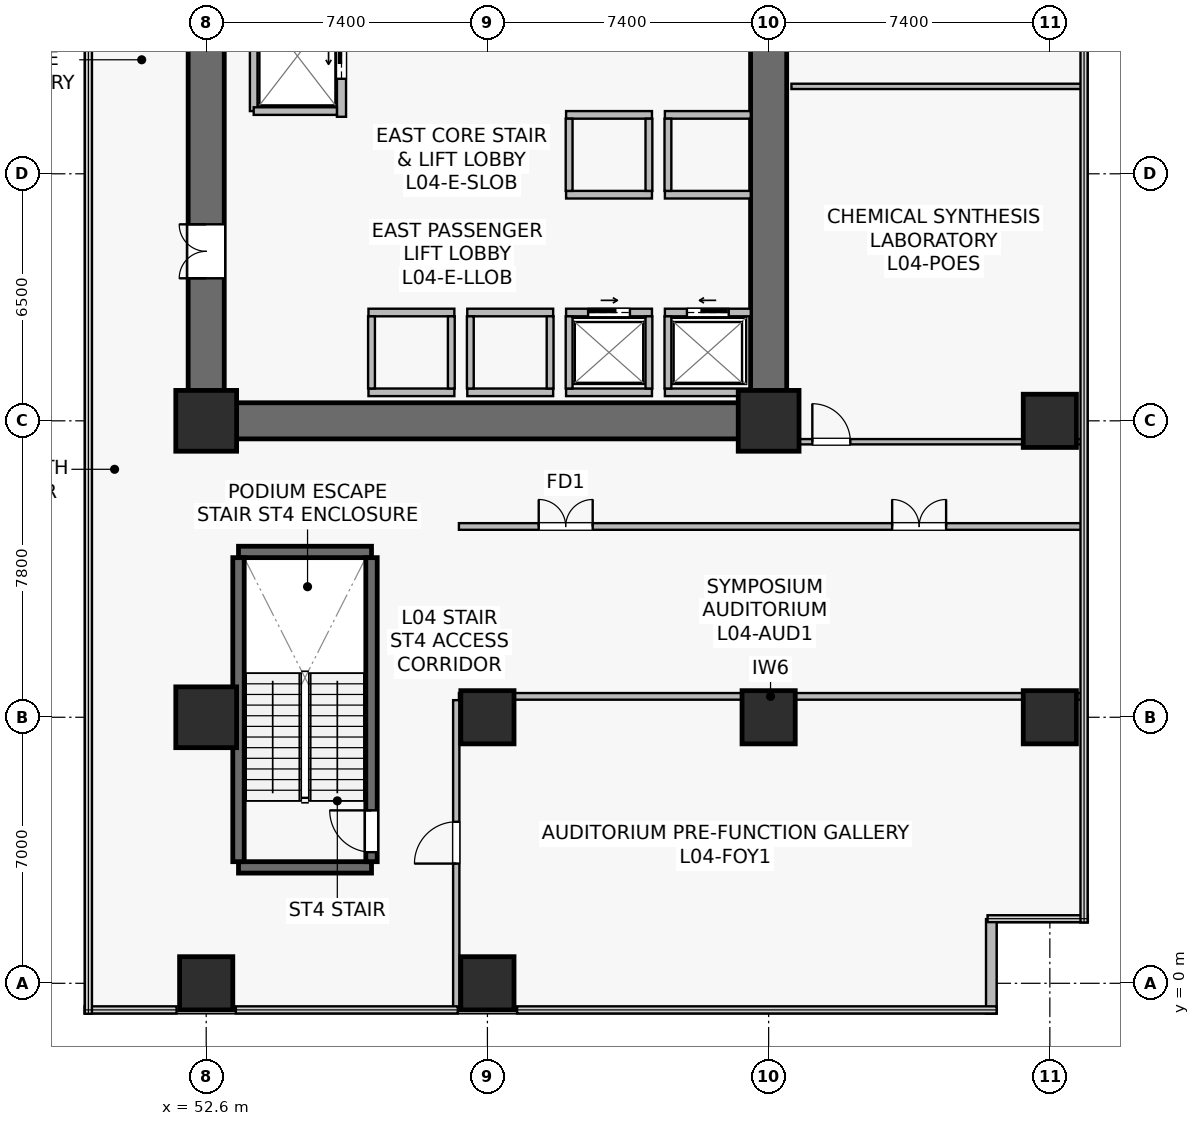
"""IFC4 building model, lengths in metres.
Left out: names, types, materials, properties, quantities, classifications, styles, units other than length and angle.
Written with IfcOpenShell. Run it as: python <this file> out.ifc"""

import sys

from ifc_helpers import new_model, si_unit, direction, frame, frame_2d, origin, origin_2d, place, context, subcontext, project, spatial, rectangle, extrude, source, transform, mapped, element, fill, save


model = new_model("IFC4")
c1 = context("Model", 3, precision=1e-05, world=origin(), true_north=direction((0.0, 1.0)))
c2 = subcontext(c1, "Body", "Model", "MODEL_VIEW")
j1 = project(units=[si_unit("LENGTHUNIT", "METRE"), si_unit("PLANEANGLEUNIT", "RADIAN")], contexts=[c1])
p1 = place(None, origin())
s1 = spatial("IfcSite", under=j1, at=p1, CompositionType="ELEMENT")
p2 = place(p1, origin())
s2 = spatial("IfcBuilding", under=s1, at=p2, CompositionType="ELEMENT")
p3 = place(p2, frame((0.0, 0.0, 15.0)))
s3 = spatial("IfcBuildingStorey", under=s2, at=p3, CompositionType="ELEMENT", Elevation=15.0)
p4 = place(p3, frame((52.125, 14.8, 0.0), z_axis=(0.0, 0.0, 1.0), x_axis=(1.0, 0.0, 0.0)))
e1 = element("IfcWall", 1, at=p4, inside=s3, PredefinedType="SHEAR", context=c2, shape_type="SweptSolid", body=[
    extrude(rectangle(XDim=15.75, YDim=0.95, at=frame_2d((7.875, 0.0))), origin(), (0.0, 0.0, 1.0), 4.45),
])
p5 = place(p3, frame((52.6, 15.275, 0.0), z_axis=(0.0, 0.0, 1.0), x_axis=(0.0, 1.0, 0.0)))
e2 = element("IfcWall", 2, at=p5, inside=s3, PredefinedType="SHEAR", context=c2, shape_type="SweptSolid", body=[
    extrude(rectangle(XDim=18.05, YDim=0.95, at=frame_2d((9.025, 0.0))), origin(), (0.0, 0.0, 1.0), 4.45),
])
p6 = place(p5, frame((3.275, 0.0, 0.0)))
e3 = element("IfcOpeningElement", 3, at=p6, cuts=e2, PredefinedType="OPENING", context=c2, shape_type="SweptSolid", body=[
    extrude(rectangle(XDim=1.42, YDim=2.2, at=frame_2d((0.71, 1.1))), frame((0.0, 0.485, 0.0), z_axis=(0.0, -1.0, 0.0), x_axis=(1.0, 0.0, 0.0)), (0.0, 0.0, 1.0), 0.97),
])
p7 = place(p3, frame((67.4, 15.275, 0.0), z_axis=(0.0, 0.0, 1.0), x_axis=(0.0, 1.0, 0.0)))
e4 = element("IfcWall", 4, at=p7, inside=s3, PredefinedType="SHEAR", context=c2, shape_type="SweptSolid", body=[
    extrude(rectangle(XDim=18.05, YDim=0.95, at=frame_2d((9.025, 0.0))), origin(), (0.0, 0.0, 1.0), 4.45),
])
for number, where, z_axis, x_axis in (
    (5, (53.45, 3.05, 0.0), (0.0, 0.0, 1.0), (1.0, 0.0, 0.0)),
    (6, (53.45, 11.35, 0.0), (0.0, 0.0, 1.0), (1.0, 0.0, 0.0)),
):
    element("IfcWall", number, at=place(p3, frame(where, z_axis=z_axis, x_axis=x_axis)), inside=s3, PredefinedType="SHEAR", context=c2, shape_type="SweptSolid", body=[
        extrude(rectangle(XDim=3.5, YDim=0.3, at=frame_2d((1.75, 0.0))), origin(), (0.0, 0.0, 1.0), 4.45),
    ])
p8 = place(p3, frame((53.45, 3.2, 0.0), z_axis=(0.0, 0.0, 1.0), x_axis=(0.0, 1.0, 0.0)))
e7 = element("IfcWall", 7, at=p8, inside=s3, PredefinedType="SHEAR", context=c2, shape_type="SweptSolid", body=[
    extrude(rectangle(XDim=8.0, YDim=0.3, at=frame_2d((4.0, 0.0))), origin(), (0.0, 0.0, 1.0), 4.45),
])
p9 = place(p3, frame((56.95, 3.2, 0.0), z_axis=(0.0, 0.0, 1.0), x_axis=(0.0, 1.0, 0.0)))
e8 = element("IfcWall", 8, at=p9, inside=s3, PredefinedType="SHEAR", context=c2, shape_type="SweptSolid", body=[
    extrude(rectangle(XDim=8.0, YDim=0.3, at=frame_2d((4.0, 0.0))), origin(), (0.0, 0.0, 1.0), 4.45),
])
p10 = place(p9, frame((0.25, 0.0, 0.0)))
e9 = element("IfcOpeningElement", 9, at=p10, cuts=e8, PredefinedType="OPENING", context=c2, shape_type="SweptSolid", body=[
    extrude(rectangle(XDim=1.1, YDim=2.15, at=frame_2d((0.55, 1.075))), frame((0.0, 0.16, 0.0), z_axis=(0.0, -1.0, 0.0), x_axis=(1.0, 0.0, 0.0)), (0.0, 0.0, 1.0), 0.32),
])
m1 = source(origin(), c2, "Body", "SweptSolid", [
    extrude(rectangle(XDim=1.6, YDim=1.6, at=origin_2d()), origin(), (0.0, 0.0, 1.0), 4.8),
])
p11 = place(p3, frame((52.6, 7.0, 0.0), z_axis=(0.0, 0.0, 1.0), x_axis=(1.0, 0.0, 0.0)))
e10 = element("IfcColumn", 10, at=p11, inside=s3, PredefinedType="COLUMN", context=c2, shape_type="MappedRepresentation", body=[
    mapped(m1, transform((0.0, 0.0, 0.0), scale=1.0)),
])
m2 = source(origin(), c2, "Body", "SweptSolid", [
    extrude(rectangle(XDim=1.4, YDim=1.4, at=origin_2d()), origin(), (0.0, 0.0, 1.0), 4.8),
])
p12 = place(p3, frame((60.0, 7.0, 0.0), z_axis=(0.0, 0.0, 1.0), x_axis=(1.0, 0.0, 0.0)))
e11 = element("IfcColumn", 11, at=p12, inside=s3, PredefinedType="COLUMN", context=c2, shape_type="MappedRepresentation", body=[
    mapped(m2, transform((0.0, 0.0, 0.0), scale=1.0)),
])
for number, where, z_axis, x_axis in (
    (12, (52.6, 14.8, 0.0), (0.0, 0.0, 1.0), (1.0, 0.0, 0.0)),
    (13, (67.4, 14.8, 0.0), (0.0, 0.0, 1.0), (1.0, 0.0, 0.0)),
):
    element("IfcColumn", number, at=place(p3, frame(where, z_axis=z_axis, x_axis=x_axis)), inside=s3, PredefinedType="COLUMN", context=c2, shape_type="MappedRepresentation", body=[
        mapped(m1, transform((0.0, 0.0, 0.0), scale=1.0)),
    ])
for number, where, z_axis, x_axis in (
    (14, (67.4, 7.0, 0.0), (0.0, 0.0, 1.0), (1.0, 0.0, 0.0)),
    (15, (74.8, 7.0, 0.0), (0.0, 0.0, 1.0), (1.0, 0.0, 0.0)),
    (16, (74.8, 14.8, 0.0), (0.0, 0.0, 1.0), (1.0, 0.0, 0.0)),
    (17, (52.6, 0.0, 0.0), (0.0, 0.0, 1.0), (1.0, 0.0, 0.0)),
    (18, (60.0, 0.0, 0.0), (0.0, 0.0, 1.0), (1.0, 0.0, 0.0)),
):
    element("IfcColumn", number, at=place(p3, frame(where, z_axis=z_axis, x_axis=x_axis)), inside=s3, PredefinedType="COLUMN", context=c2, shape_type="MappedRepresentation", body=[
        mapped(m2, transform((0.0, 0.0, 0.0), scale=1.0)),
    ])
p13 = place(p3, frame((73.26, -0.8, 0.0), z_axis=(0.0, 0.0, 1.0), x_axis=(0.0, 1.0, 0.0)))
e19 = element("IfcWall", 19, at=p13, inside=s3, PredefinedType="STANDARD", context=c2, shape_type="SweptSolid", body=[
    extrude(rectangle(XDim=2.488, YDim=0.28, at=frame_2d((1.244, 0.0))), origin(), (0.0, 0.0, 1.0), 4.45),
])
p14 = place(p3, frame((56.16, 22.8, 0.0), z_axis=(0.0, 0.0, 1.0), x_axis=(0.0, 1.0, 0.0)))
e20 = element("IfcWall", 20, at=p14, inside=s3, PredefinedType="SOLIDWALL", context=c2, shape_type="SweptSolid", body=[
    extrude(rectangle(XDim=6.85, YDim=0.24, at=frame_2d((3.425, 0.0))), origin(), (0.0, 0.0, 1.0), 3.535),
])
p15 = place(p14, frame((4.85, 0.0, 0.0)))
e21 = element("IfcOpeningElement", 21, at=p15, cuts=e20, PredefinedType="OPENING", context=c2, shape_type="SweptSolid", body=[
    extrude(rectangle(XDim=1.1, YDim=2.22, at=frame_2d((0.55, 1.11))), frame((0.0, 0.13, 0.0), z_axis=(0.0, -1.0, 0.0), x_axis=(1.0, 0.0, 0.0)), (0.0, 0.0, 1.0), 0.26),
])
p16 = place(p14, frame((1.0, 0.0, 0.0)))
e22 = element("IfcOpeningElement", 22, at=p16, cuts=e20, PredefinedType="OPENING", context=c2, shape_type="SweptSolid", body=[
    extrude(rectangle(XDim=1.2, YDim=2.22, at=frame_2d((0.6, 1.11))), frame((0.0, 0.13, 0.0), z_axis=(0.0, -1.0, 0.0), x_axis=(1.0, 0.0, 0.0)), (0.0, 0.0, 1.0), 0.26),
])
p17 = place(p3, frame((64.67, 17.65, 0.0), z_axis=(0.0, 0.0, 1.0), x_axis=(1.0, 0.0, 0.0)))
e23 = element("IfcWall", 23, at=p17, inside=s3, PredefinedType="SOLIDWALL", context=c2, shape_type="SweptSolid", body=[
    extrude(rectangle(XDim=2.26, YDim=0.2, at=frame_2d((1.13, 0.0))), origin(), (0.0, 0.0, 1.0), 4.45),
])
p18 = place(p17, frame((0.58, 0.0, 0.0)))
e24 = element("IfcOpeningElement", 24, at=p18, cuts=e23, PredefinedType="OPENING", context=c2, shape_type="SweptSolid", body=[
    extrude(rectangle(XDim=1.1, YDim=2.22, at=frame_2d((0.55, 1.11))), frame((0.0, 0.11, 0.0), z_axis=(0.0, -1.0, 0.0), x_axis=(1.0, 0.0, 0.0)), (0.0, 0.0, 1.0), 0.22),
])
p19 = place(p3, frame((64.67, 15.55, 0.0), z_axis=(0.0, 0.0, 1.0), x_axis=(1.0, 0.0, 0.0)))
e25 = element("IfcWall", 25, at=p19, inside=s3, PredefinedType="SOLIDWALL", context=c2, shape_type="SweptSolid", body=[
    extrude(rectangle(XDim=2.26, YDim=0.2, at=frame_2d((1.13, 0.0))), origin(), (0.0, 0.0, 1.0), 4.45),
])
p20 = place(p3, frame((64.75, 15.65, 0.0), z_axis=(0.0, 0.0, 1.0), x_axis=(0.0, 1.0, 0.0)))
e26 = element("IfcWall", 26, at=p20, inside=s3, PredefinedType="SOLIDWALL", context=c2, shape_type="SweptSolid", body=[
    extrude(rectangle(XDim=1.9, YDim=0.18, at=frame_2d((0.95, 0.0))), origin(), (0.0, 0.0, 1.0), 4.45),
])
p21 = place(p3, frame((62.07, 17.65, 0.0), z_axis=(0.0, 0.0, 1.0), x_axis=(1.0, 0.0, 0.0)))
e27 = element("IfcWall", 27, at=p21, inside=s3, PredefinedType="SOLIDWALL", context=c2, shape_type="SweptSolid", body=[
    extrude(rectangle(XDim=2.26, YDim=0.2, at=frame_2d((1.13, 0.0))), origin(), (0.0, 0.0, 1.0), 4.45),
])
p22 = place(p21, frame((0.58, 0.0, 0.0)))
e28 = element("IfcOpeningElement", 28, at=p22, cuts=e27, PredefinedType="OPENING", context=c2, shape_type="SweptSolid", body=[
    extrude(rectangle(XDim=1.1, YDim=2.22, at=frame_2d((0.55, 1.11))), frame((0.0, 0.11, 0.0), z_axis=(0.0, -1.0, 0.0), x_axis=(1.0, 0.0, 0.0)), (0.0, 0.0, 1.0), 0.22),
])
p23 = place(p3, frame((62.07, 15.55, 0.0), z_axis=(0.0, 0.0, 1.0), x_axis=(1.0, 0.0, 0.0)))
e29 = element("IfcWall", 29, at=p23, inside=s3, PredefinedType="SOLIDWALL", context=c2, shape_type="SweptSolid", body=[
    extrude(rectangle(XDim=2.26, YDim=0.2, at=frame_2d((1.13, 0.0))), origin(), (0.0, 0.0, 1.0), 4.45),
])
for number, where, z_axis, x_axis in (
    (30, (62.15, 15.65, 0.0), (0.0, 0.0, 1.0), (0.0, 1.0, 0.0)),
    (31, (64.25, 15.65, 0.0), (0.0, 0.0, 1.0), (0.0, 1.0, 0.0)),
):
    element("IfcWall", number, at=place(p3, frame(where, z_axis=z_axis, x_axis=x_axis)), inside=s3, PredefinedType="SOLIDWALL", context=c2, shape_type="SweptSolid", body=[
        extrude(rectangle(XDim=1.9, YDim=0.18, at=frame_2d((0.95, 0.0))), origin(), (0.0, 0.0, 1.0), 4.45),
    ])
for number, where, z_axis, x_axis in (
    (32, (59.47, 17.65, 0.0), (0.0, 0.0, 1.0), (1.0, 0.0, 0.0)),
    (33, (59.47, 15.55, 0.0), (0.0, 0.0, 1.0), (1.0, 0.0, 0.0)),
):
    element("IfcWall", number, at=place(p3, frame(where, z_axis=z_axis, x_axis=x_axis)), inside=s3, PredefinedType="SOLIDWALL", context=c2, shape_type="SweptSolid", body=[
        extrude(rectangle(XDim=2.26, YDim=0.2, at=frame_2d((1.13, 0.0))), origin(), (0.0, 0.0, 1.0), 3.735),
    ])
for number, where, z_axis, x_axis in (
    (34, (59.55, 15.65, 0.0), (0.0, 0.0, 1.0), (0.0, 1.0, 0.0)),
    (35, (61.65, 15.65, 0.0), (0.0, 0.0, 1.0), (0.0, 1.0, 0.0)),
):
    element("IfcWall", number, at=place(p3, frame(where, z_axis=z_axis, x_axis=x_axis)), inside=s3, PredefinedType="SOLIDWALL", context=c2, shape_type="SweptSolid", body=[
        extrude(rectangle(XDim=1.9, YDim=0.18, at=frame_2d((0.95, 0.0))), origin(), (0.0, 0.0, 1.0), 4.45),
    ])
for number, where, z_axis, x_axis in (
    (36, (56.87, 17.65, 0.0), (0.0, 0.0, 1.0), (1.0, 0.0, 0.0)),
    (37, (56.87, 15.55, 0.0), (0.0, 0.0, 1.0), (1.0, 0.0, 0.0)),
):
    element("IfcWall", number, at=place(p3, frame(where, z_axis=z_axis, x_axis=x_axis)), inside=s3, PredefinedType="SOLIDWALL", context=c2, shape_type="SweptSolid", body=[
        extrude(rectangle(XDim=2.26, YDim=0.2, at=frame_2d((1.13, 0.0))), origin(), (0.0, 0.0, 1.0), 4.45),
    ])
for number, where, z_axis, x_axis in (
    (38, (56.95, 15.65, 0.0), (0.0, 0.0, 1.0), (0.0, 1.0, 0.0)),
    (39, (59.05, 15.65, 0.0), (0.0, 0.0, 1.0), (0.0, 1.0, 0.0)),
):
    element("IfcWall", number, at=place(p3, frame(where, z_axis=z_axis, x_axis=x_axis)), inside=s3, PredefinedType="SOLIDWALL", context=c2, shape_type="SweptSolid", body=[
        extrude(rectangle(XDim=1.9, YDim=0.18, at=frame_2d((0.95, 0.0))), origin(), (0.0, 0.0, 1.0), 4.45),
    ])
for number, where, z_axis, x_axis in (
    (40, (64.67, 20.75, 0.0), (0.0, 0.0, 1.0), (1.0, 0.0, 0.0)),
    (41, (64.67, 22.85, 0.0), (0.0, 0.0, 1.0), (1.0, 0.0, 0.0)),
):
    element("IfcWall", number, at=place(p3, frame(where, z_axis=z_axis, x_axis=x_axis)), inside=s3, PredefinedType="SOLIDWALL", context=c2, shape_type="SweptSolid", body=[
        extrude(rectangle(XDim=2.26, YDim=0.2, at=frame_2d((1.13, 0.0))), origin(), (0.0, 0.0, 1.0), 4.45),
    ])
p24 = place(p3, frame((64.75, 20.85, 0.0), z_axis=(0.0, 0.0, 1.0), x_axis=(0.0, 1.0, 0.0)))
e42 = element("IfcWall", 42, at=p24, inside=s3, PredefinedType="SOLIDWALL", context=c2, shape_type="SweptSolid", body=[
    extrude(rectangle(XDim=1.9, YDim=0.18, at=frame_2d((0.95, 0.0))), origin(), (0.0, 0.0, 1.0), 4.45),
])
for number, where, z_axis, x_axis in (
    (43, (62.07, 20.75, 0.0), (0.0, 0.0, 1.0), (1.0, 0.0, 0.0)),
    (44, (62.07, 22.85, 0.0), (0.0, 0.0, 1.0), (1.0, 0.0, 0.0)),
):
    element("IfcWall", number, at=place(p3, frame(where, z_axis=z_axis, x_axis=x_axis)), inside=s3, PredefinedType="SOLIDWALL", context=c2, shape_type="SweptSolid", body=[
        extrude(rectangle(XDim=2.26, YDim=0.2, at=frame_2d((1.13, 0.0))), origin(), (0.0, 0.0, 1.0), 4.45),
    ])
for number, where, z_axis, x_axis in (
    (45, (62.15, 20.85, 0.0), (0.0, 0.0, 1.0), (0.0, 1.0, 0.0)),
    (46, (64.25, 20.85, 0.0), (0.0, 0.0, 1.0), (0.0, 1.0, 0.0)),
):
    element("IfcWall", number, at=place(p3, frame(where, z_axis=z_axis, x_axis=x_axis)), inside=s3, PredefinedType="SOLIDWALL", context=c2, shape_type="SweptSolid", body=[
        extrude(rectangle(XDim=1.9, YDim=0.18, at=frame_2d((0.95, 0.0))), origin(), (0.0, 0.0, 1.0), 4.45),
    ])
p25 = place(p3, frame((53.85, 22.95, 0.0), z_axis=(0.0, 0.0, 1.0), x_axis=(0.0, 1.0, 0.0)))
e47 = element("IfcWall", 47, at=p25, inside=s3, PredefinedType="SOLIDWALL", context=c2, shape_type="SweptSolid", body=[
    extrude(rectangle(XDim=2.9, YDim=0.2, at=frame_2d((1.45, 0.0))), origin(), (0.0, 0.0, 1.0), 3.535),
])
p26 = place(p3, frame((53.85, 22.95, 0.0), z_axis=(0.0, 0.0, 1.0), x_axis=(1.0, 0.0, 0.0)))
e48 = element("IfcWall", 48, at=p26, inside=s3, PredefinedType="SOLIDWALL", context=c2, shape_type="SweptSolid", body=[
    extrude(rectangle(XDim=2.19, YDim=0.2, at=frame_2d((1.095, 0.0))), origin(), (0.0, 0.0, 1.0), 4.45),
])
p27 = place(p3, frame((68.0, 23.6, 0.0), z_axis=(0.0, 0.0, 1.0), x_axis=(1.0, 0.0, 0.0)))
e49 = element("IfcWall", 49, at=p27, inside=s3, PredefinedType="PARTITIONING", context=c2, shape_type="SweptSolid", body=[
    extrude(rectangle(XDim=7.65, YDim=0.14, at=frame_2d((3.825, 0.0))), origin(), (0.0, 0.0, 1.0), 3.835),
])
p28 = place(p3, frame((68.0, 14.25, 0.0), z_axis=(0.0, 0.0, 1.0), x_axis=(1.0, 0.0, 0.0)))
e50 = element("IfcWall", 50, at=p28, inside=s3, PredefinedType="PARTITIONING", context=c2, shape_type="SweptSolid", body=[
    extrude(rectangle(XDim=7.65, YDim=0.14, at=frame_2d((3.825, 0.0))), origin(), (0.0, 0.0, 1.0), 3.835),
])
p29 = place(p28, frame((0.55, 0.0, 0.0)))
e51 = element("IfcOpeningElement", 51, at=p29, cuts=e50, PredefinedType="OPENING", context=c2, shape_type="SweptSolid", body=[
    extrude(rectangle(XDim=1.0, YDim=2.15, at=frame_2d((0.5, 1.075))), frame((0.0, 0.08, 0.0), z_axis=(0.0, -1.0, 0.0), x_axis=(1.0, 0.0, 0.0)), (0.0, 0.0, 1.0), 0.16),
])
p30 = place(p3, frame((59.25, 7.55, 0.0), z_axis=(0.0, 0.0, 1.0), x_axis=(1.0, 0.0, 0.0)))
e52 = element("IfcWall", 52, at=p30, inside=s3, PredefinedType="PARTITIONING", context=c2, shape_type="SweptSolid", body=[
    extrude(rectangle(XDim=16.4, YDim=0.175, at=frame_2d((8.2, 0.0))), origin(), (0.0, 0.0, 1.0), 3.735),
])
p31 = place(p3, frame((59.25, 12.02, 0.0), z_axis=(0.0, 0.0, 1.0), x_axis=(1.0, 0.0, 0.0)))
e53 = element("IfcWall", 53, at=p31, inside=s3, PredefinedType="PARTITIONING", context=c2, shape_type="SweptSolid", body=[
    extrude(rectangle(XDim=16.4, YDim=0.175, at=frame_2d((8.2, 0.0))), origin(), (0.0, 0.0, 1.0), 3.735),
])
p32 = place(p31, frame((2.1, 0.0, 0.0)))
e54 = element("IfcOpeningElement", 54, at=p32, cuts=e53, PredefinedType="OPENING", context=c2, shape_type="SweptSolid", body=[
    extrude(rectangle(XDim=1.42, YDim=2.2, at=frame_2d((0.71, 1.1))), frame((0.0, 0.098, 0.0), z_axis=(0.0, -1.0, 0.0), x_axis=(1.0, 0.0, 0.0)), (0.0, 0.0, 1.0), 0.195),
])
p33 = place(p31, frame((11.4, 0.0, 0.0)))
e55 = element("IfcOpeningElement", 55, at=p33, cuts=e53, PredefinedType="OPENING", context=c2, shape_type="SweptSolid", body=[
    extrude(rectangle(XDim=1.42, YDim=2.2, at=frame_2d((0.71, 1.1))), frame((0.0, 0.098, 0.0), z_axis=(0.0, -1.0, 0.0), x_axis=(1.0, 0.0, 0.0)), (0.0, 0.0, 1.0), 0.195),
])
p34 = place(p3, frame((59.18, -0.65, 0.0), z_axis=(0.0, 0.0, 1.0), x_axis=(0.0, 1.0, 0.0)))
e56 = element("IfcWall", 56, at=p34, inside=s3, PredefinedType="PARTITIONING", context=c2, shape_type="SweptSolid", body=[
    extrude(rectangle(XDim=8.1, YDim=0.165, at=frame_2d((4.05, 0.0))), origin(), (0.0, 0.0, 1.0), 3.847),
])
p35 = place(p34, frame((3.8, 0.0, 0.0)))
e57 = element("IfcOpeningElement", 57, at=p35, cuts=e56, PredefinedType="OPENING", context=c2, shape_type="SweptSolid", body=[
    extrude(rectangle(XDim=1.1, YDim=2.18, at=frame_2d((0.55, 1.09))), frame((0.0, 0.093, 0.0), z_axis=(0.0, -1.0, 0.0), x_axis=(1.0, 0.0, 0.0)), (0.0, 0.0, 1.0), 0.185),
])
m3 = source(origin(), c2, "Body", "SweptSolid", [
    extrude(rectangle(XDim=1.1, YDim=2.22, at=frame_2d((0.55, 1.11))), frame((0.0, 0.025, 0.0), z_axis=(0.0, -1.0, 0.0), x_axis=(1.0, 0.0, 0.0)), (0.0, 0.0, 1.0), 0.05),
])
p36 = place(p18, origin())
e58 = element("IfcDoor", 58, at=p36, inside=s3, OperationType="SLIDING_TO_LEFT", PredefinedType="USERDEFINED", context=c2, shape_type="MappedRepresentation", body=[
    mapped(m3, transform((0.0, 0.0, 0.0), scale=1.0)),
])
fill(e24, e58)
p37 = place(p22, origin())
e59 = element("IfcDoor", 59, at=p37, inside=s3, OperationType="SLIDING_TO_RIGHT", PredefinedType="USERDEFINED", context=c2, shape_type="MappedRepresentation", body=[
    mapped(m3, transform((0.0, 0.0, 0.0), scale=1.0)),
])
fill(e28, e59)
m4 = source(origin(), c2, "Body", "SweptSolid", [
    extrude(rectangle(XDim=1.2, YDim=2.22, at=frame_2d((0.6, 1.11))), frame((0.0, 0.025, 0.0), z_axis=(0.0, -1.0, 0.0), x_axis=(1.0, 0.0, 0.0)), (0.0, 0.0, 1.0), 0.05),
])
p38 = place(p16, origin())
e60 = element("IfcDoor", 60, at=p38, inside=s3, OperationType="SLIDING_TO_LEFT", PredefinedType="USERDEFINED", context=c2, shape_type="MappedRepresentation", body=[
    mapped(m4, transform((0.0, 0.0, 0.0), scale=1.0)),
])
fill(e22, e60)
m5 = source(origin(), c2, "Body", "SweptSolid", [
    extrude(rectangle(XDim=1.42, YDim=2.2, at=frame_2d((0.71, 1.1))), frame((0.0, 0.025, 0.0), z_axis=(0.0, -1.0, 0.0), x_axis=(1.0, 0.0, 0.0)), (0.0, 0.0, 1.0), 0.05),
])
p39 = place(p6, origin())
e61 = element("IfcDoor", 61, at=p39, inside=s3, OperationType="DOUBLE_DOOR_SINGLE_SWING", PredefinedType="DOOR", context=c2, shape_type="MappedRepresentation", body=[
    mapped(m5, transform((0.0, 0.0, 0.0), scale=1.0)),
])
fill(e3, e61)
m6 = source(origin(), c2, "Body", "SweptSolid", [
    extrude(rectangle(XDim=1.1, YDim=2.15, at=frame_2d((0.55, 1.075))), frame((0.0, 0.025, 0.0), z_axis=(0.0, -1.0, 0.0), x_axis=(1.0, 0.0, 0.0)), (0.0, 0.0, 1.0), 0.05),
])
p40 = place(p10, origin())
e62 = element("IfcDoor", 62, at=p40, inside=s3, OperationType="SINGLE_SWING_RIGHT", PredefinedType="DOOR", context=c2, shape_type="MappedRepresentation", body=[
    mapped(m6, transform((0.0, 0.0, 0.0), scale=1.0)),
])
fill(e9, e62)
m7 = source(origin(), c2, "Body", "SweptSolid", [
    extrude(rectangle(XDim=1.0, YDim=2.15, at=frame_2d((0.5, 1.075))), frame((0.0, 0.025, 0.0), z_axis=(0.0, -1.0, 0.0), x_axis=(1.0, 0.0, 0.0)), (0.0, 0.0, 1.0), 0.05),
])
p41 = place(p29, origin())
e63 = element("IfcDoor", 63, at=p41, inside=s3, OperationType="SINGLE_SWING_LEFT", PredefinedType="DOOR", context=c2, shape_type="MappedRepresentation", body=[
    mapped(m7, transform((0.0, 0.0, 0.0), scale=1.0)),
])
fill(e51, e63)
p42 = place(p32, origin())
e64 = element("IfcDoor", 64, at=p42, inside=s3, OperationType="DOUBLE_DOOR_SINGLE_SWING", PredefinedType="DOOR", context=c2, shape_type="MappedRepresentation", body=[
    mapped(m5, transform((0.0, 0.0, 0.0), scale=1.0)),
])
fill(e54, e64)
p43 = place(p33, origin())
e65 = element("IfcDoor", 65, at=p43, inside=s3, OperationType="DOUBLE_DOOR_SINGLE_SWING", PredefinedType="DOOR", context=c2, shape_type="MappedRepresentation", body=[
    mapped(m5, transform((0.0, 0.0, 0.0), scale=1.0)),
])
fill(e55, e65)
m8 = source(origin(), c2, "Body", "SweptSolid", [
    extrude(rectangle(XDim=1.1, YDim=2.18, at=frame_2d((0.55, 1.09))), frame((0.0, 0.025, 0.0), z_axis=(0.0, -1.0, 0.0), x_axis=(1.0, 0.0, 0.0)), (0.0, 0.0, 1.0), 0.05),
])
p44 = place(p35, origin())
e66 = element("IfcDoor", 66, at=p44, inside=s3, OperationType="SINGLE_SWING_LEFT", PredefinedType="DOOR", context=c2, shape_type="MappedRepresentation", body=[
    mapped(m8, transform((0.0, 0.0, 0.0), scale=1.0)),
])
fill(e57, e66)
save(model, sys.argv[1])
